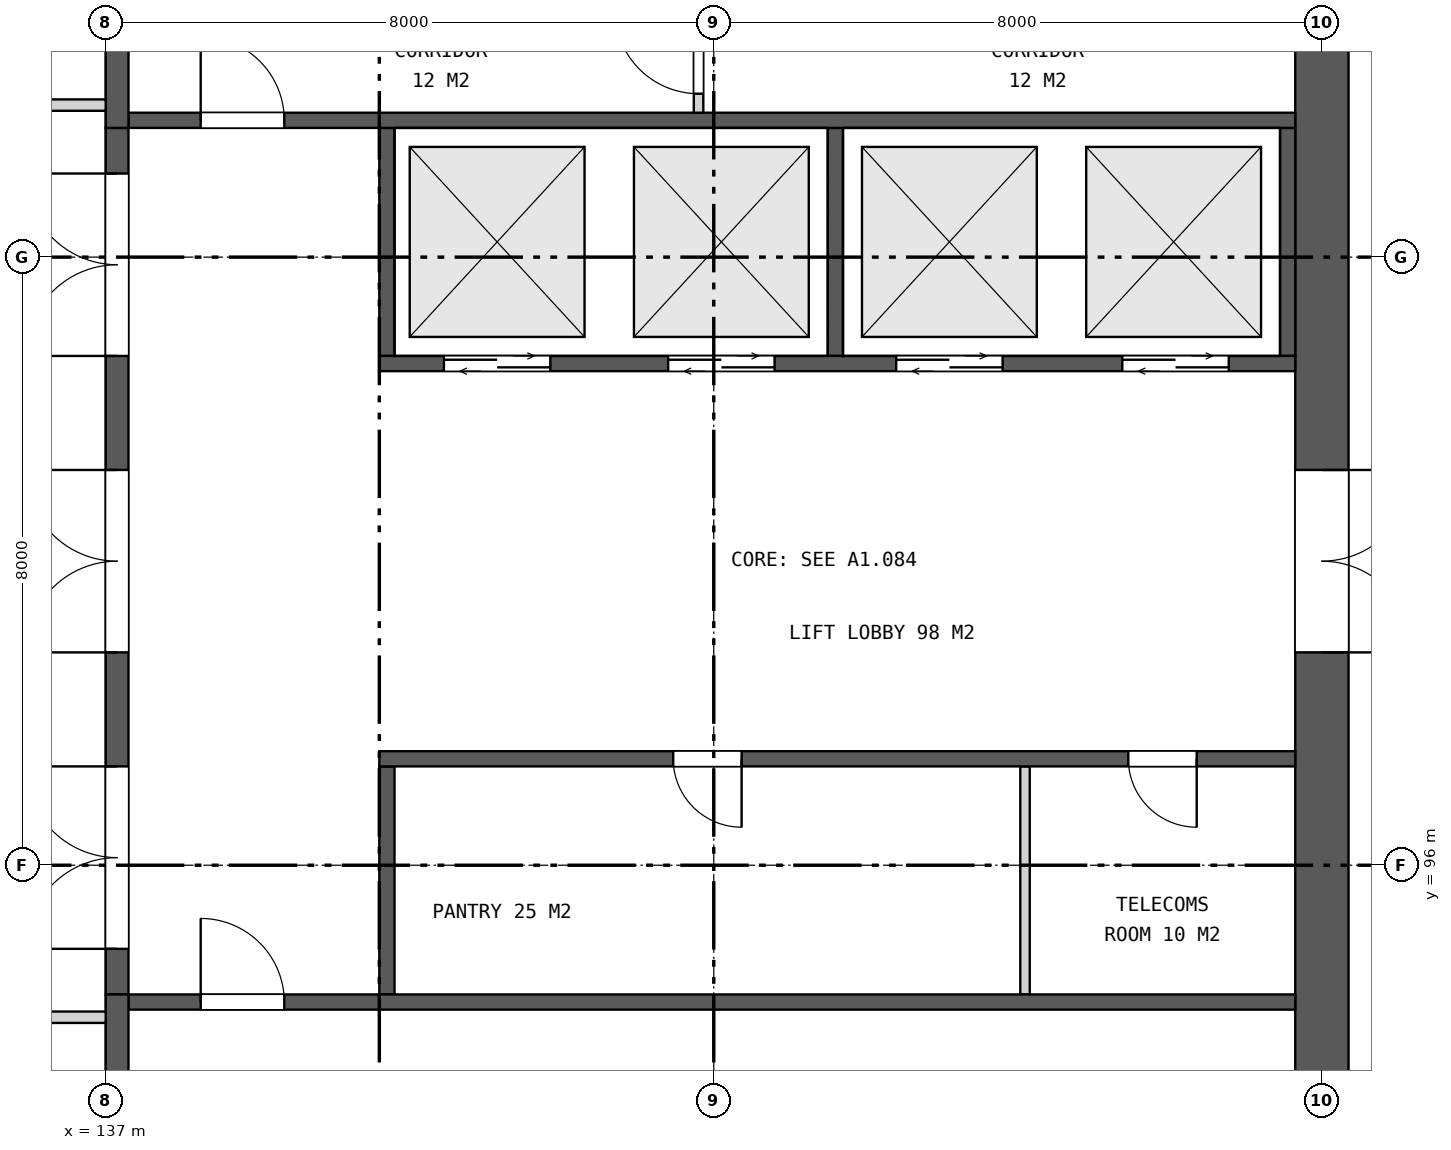
"""IFC4 building model, lengths in metres.
Left out: names, types, materials, properties, quantities, classifications, styles, units other than length and angle.
Written with IfcOpenShell. Run it as: python <this file> out.ifc"""

import sys

from ifc_helpers import new_model, si_unit, direction, frame, frame_2d, origin, place, context, subcontext, project, spatial, rectangle, extrude, element, fill, save


model = new_model("IFC4")
c1 = context("Model", 3, precision=1e-05, world=origin(), true_north=direction((0.0, 1.0)))
c2 = subcontext(c1, "Body", "Model", "MODEL_VIEW")
j1 = project(units=[si_unit("LENGTHUNIT", "METRE"), si_unit("PLANEANGLEUNIT", "RADIAN")], contexts=[c1])
p1 = place(None, origin())
s1 = spatial("IfcSite", under=j1, at=p1, CompositionType="ELEMENT")
p2 = place(p1, origin())
s2 = spatial("IfcBuilding", under=s1, at=p2, CompositionType="ELEMENT")
p3 = place(p2, frame((0.0, 0.0, 167.3)))
s3 = spatial("IfcBuildingStorey", under=s2, at=p3, CompositionType="ELEMENT", Elevation=167.3)
p4 = place(p3, frame((153.0, 88.35, 0.0), z_axis=(0.0, 0.0, 1.0), x_axis=(0.0, 1.0, 0.0)))
e1 = element("IfcWall", 1, at=p4, inside=s3, PredefinedType="SHEAR", context=c2, shape_type="SweptSolid", body=[
    extrude(rectangle(XDim=23.3, YDim=0.7, at=frame_2d((11.65, 0.0))), origin(), (0.0, 0.0, 1.0), 4.2),
])
p5 = place(p4, frame((10.45, 0.0, 0.0)))
e2 = element("IfcOpeningElement", 2, at=p5, cuts=e1, PredefinedType="OPENING", context=c2, shape_type="SweptSolid", body=[
    extrude(rectangle(XDim=2.4, YDim=2.4, at=frame_2d((1.2, 1.2))), frame((0.0, 0.36, 0.0), z_axis=(0.0, -1.0, 0.0), x_axis=(1.0, 0.0, 0.0)), (0.0, 0.0, 1.0), 0.72),
])
p6 = place(p3, frame((137.15, 94.3, 0.0), z_axis=(0.0, 0.0, 1.0), x_axis=(0.0, 1.0, 0.0)))
e3 = element("IfcWall", 3, at=p6, inside=s3, PredefinedType="SHEAR", context=c2, shape_type="SweptSolid", body=[
    extrude(rectangle(XDim=11.4, YDim=0.3, at=frame_2d((5.7, 0.0))), origin(), (0.0, 0.0, 1.0), 4.2),
])
p7 = place(p6, frame((0.6, 0.0, 0.0)))
e4 = element("IfcOpeningElement", 4, at=p7, cuts=e3, PredefinedType="OPENING", context=c2, shape_type="SweptSolid", body=[
    extrude(rectangle(XDim=2.4, YDim=2.4, at=frame_2d((1.2, 1.2))), frame((0.0, 0.16, 0.0), z_axis=(0.0, -1.0, 0.0), x_axis=(1.0, 0.0, 0.0)), (0.0, 0.0, 1.0), 0.32),
])
p8 = place(p6, frame((4.5, 0.0, 0.0)))
e5 = element("IfcOpeningElement", 5, at=p8, cuts=e3, PredefinedType="OPENING", context=c2, shape_type="SweptSolid", body=[
    extrude(rectangle(XDim=2.4, YDim=2.4, at=frame_2d((1.2, 1.2))), frame((0.0, 0.16, 0.0), z_axis=(0.0, -1.0, 0.0), x_axis=(1.0, 0.0, 0.0)), (0.0, 0.0, 1.0), 0.32),
])
p9 = place(p6, frame((8.4, 0.0, 0.0)))
e6 = element("IfcOpeningElement", 6, at=p9, cuts=e3, PredefinedType="OPENING", context=c2, shape_type="SweptSolid", body=[
    extrude(rectangle(XDim=2.4, YDim=2.4, at=frame_2d((1.2, 1.2))), frame((0.0, 0.16, 0.0), z_axis=(0.0, -1.0, 0.0), x_axis=(1.0, 0.0, 0.0)), (0.0, 0.0, 1.0), 0.32),
])
for number, where, z_axis, x_axis in (
    (7, (140.7, 102.7, 0.0), (0.0, 0.0, 1.0), (0.0, 1.0, 0.0)),
    (8, (146.6, 102.7, 0.0), (0.0, 0.0, 1.0), (0.0, 1.0, 0.0)),
    (9, (152.55, 102.7, 0.0), (0.0, 0.0, 1.0), (0.0, 1.0, 0.0)),
):
    element("IfcWall", number, at=place(p3, frame(where, z_axis=z_axis, x_axis=x_axis)), inside=s3, PredefinedType="SHEAR", context=c2, shape_type="SweptSolid", body=[
        extrude(rectangle(XDim=3.0, YDim=0.2, at=frame_2d((1.5, 0.0))), origin(), (0.0, 0.0, 1.0), 4.2),
    ])
p10 = place(p3, frame((140.6, 102.6, 0.0), z_axis=(0.0, 0.0, 1.0), x_axis=(1.0, 0.0, 0.0)))
e10 = element("IfcWall", 10, at=p10, inside=s3, PredefinedType="SHEAR", context=c2, shape_type="SweptSolid", body=[
    extrude(rectangle(XDim=12.05, YDim=0.2, at=frame_2d((6.025, 0.0))), origin(), (0.0, 0.0, 1.0), 4.2),
])
p11 = place(p10, frame((0.85, 0.0, 0.0)))
e11 = element("IfcOpeningElement", 11, at=p11, cuts=e10, PredefinedType="OPENING", context=c2, shape_type="SweptSolid", body=[
    extrude(rectangle(XDim=1.4, YDim=2.1, at=frame_2d((0.7, 1.05))), frame((0.0, 0.11, 0.0), z_axis=(0.0, -1.0, 0.0), x_axis=(1.0, 0.0, 0.0)), (0.0, 0.0, 1.0), 0.22),
])
p12 = place(p10, frame((3.8, 0.0, 0.0)))
e12 = element("IfcOpeningElement", 12, at=p12, cuts=e10, PredefinedType="OPENING", context=c2, shape_type="SweptSolid", body=[
    extrude(rectangle(XDim=1.4, YDim=2.1, at=frame_2d((0.7, 1.05))), frame((0.0, 0.11, 0.0), z_axis=(0.0, -1.0, 0.0), x_axis=(1.0, 0.0, 0.0)), (0.0, 0.0, 1.0), 0.22),
])
p13 = place(p10, frame((6.8, 0.0, 0.0)))
e13 = element("IfcOpeningElement", 13, at=p13, cuts=e10, PredefinedType="OPENING", context=c2, shape_type="SweptSolid", body=[
    extrude(rectangle(XDim=1.4, YDim=2.1, at=frame_2d((0.7, 1.05))), frame((0.0, 0.11, 0.0), z_axis=(0.0, -1.0, 0.0), x_axis=(1.0, 0.0, 0.0)), (0.0, 0.0, 1.0), 0.22),
])
p14 = place(p10, frame((9.775, 0.0, 0.0)))
e14 = element("IfcOpeningElement", 14, at=p14, cuts=e10, PredefinedType="OPENING", context=c2, shape_type="SweptSolid", body=[
    extrude(rectangle(XDim=1.4, YDim=2.1, at=frame_2d((0.7, 1.05))), frame((0.0, 0.11, 0.0), z_axis=(0.0, -1.0, 0.0), x_axis=(1.0, 0.0, 0.0)), (0.0, 0.0, 1.0), 0.22),
])
p15 = place(p3, frame((140.7, 94.3, 0.0), z_axis=(0.0, 0.0, 1.0), x_axis=(0.0, 1.0, 0.0)))
e15 = element("IfcWall", 15, at=p15, inside=s3, PredefinedType="SHEAR", context=c2, shape_type="SweptSolid", body=[
    extrude(rectangle(XDim=3.0, YDim=0.2, at=frame_2d((1.5, 0.0))), origin(), (0.0, 0.0, 1.0), 4.2),
])
p16 = place(p3, frame((149.095, 94.3, 0.0), z_axis=(0.0, 0.0, 1.0), x_axis=(0.0, 1.0, 0.0)))
e16 = element("IfcWall", 16, at=p16, inside=s3, PredefinedType="PARTITIONING", context=c2, shape_type="SweptSolid", body=[
    extrude(rectangle(XDim=3.0, YDim=0.125, at=frame_2d((1.5, 0.0))), origin(), (0.0, 0.0, 1.0), 4.2),
])
p17 = place(p3, frame((140.6, 97.4, 0.0), z_axis=(0.0, 0.0, 1.0), x_axis=(1.0, 0.0, 0.0)))
e17 = element("IfcWall", 17, at=p17, inside=s3, PredefinedType="SHEAR", context=c2, shape_type="SweptSolid", body=[
    extrude(rectangle(XDim=12.05, YDim=0.2, at=frame_2d((6.025, 0.0))), origin(), (0.0, 0.0, 1.0), 4.2),
])
p18 = place(p17, frame((3.866, 0.0, 0.0)))
e18 = element("IfcOpeningElement", 18, at=p18, cuts=e17, PredefinedType="OPENING", context=c2, shape_type="SweptSolid", body=[
    extrude(rectangle(XDim=0.9, YDim=2.1, at=frame_2d((0.45, 1.05))), frame((0.0, 0.11, 0.0), z_axis=(0.0, -1.0, 0.0), x_axis=(1.0, 0.0, 0.0)), (0.0, 0.0, 1.0), 0.22),
])
p19 = place(p17, frame((9.854, 0.0, 0.0)))
e19 = element("IfcOpeningElement", 19, at=p19, cuts=e17, PredefinedType="OPENING", context=c2, shape_type="SweptSolid", body=[
    extrude(rectangle(XDim=0.9, YDim=2.1, at=frame_2d((0.45, 1.05))), frame((0.0, 0.11, 0.0), z_axis=(0.0, -1.0, 0.0), x_axis=(1.0, 0.0, 0.0)), (0.0, 0.0, 1.0), 0.22),
])
p20 = place(p3, frame((137.3, 105.8, 0.0), z_axis=(0.0, 0.0, 1.0), x_axis=(1.0, 0.0, 0.0)))
e20 = element("IfcWall", 20, at=p20, inside=s3, PredefinedType="SHEAR", context=c2, shape_type="SweptSolid", body=[
    extrude(rectangle(XDim=15.35, YDim=0.2, at=frame_2d((7.675, 0.0))), origin(), (0.0, 0.0, 1.0), 4.2),
])
p21 = place(p20, frame((0.95, 0.0, 0.0)))
e21 = element("IfcOpeningElement", 21, at=p21, cuts=e20, PredefinedType="OPENING", context=c2, shape_type="SweptSolid", body=[
    extrude(rectangle(XDim=1.1, YDim=2.1, at=frame_2d((0.55, 1.05))), frame((0.0, 0.11, 0.0), z_axis=(0.0, -1.0, 0.0), x_axis=(1.0, 0.0, 0.0)), (0.0, 0.0, 1.0), 0.22),
])
p22 = place(p3, frame((137.15, 105.7, 0.0), z_axis=(0.0, 0.0, 1.0), x_axis=(0.0, 1.0, 0.0)))
e22 = element("IfcWall", 22, at=p22, inside=s3, PredefinedType="SHEAR", context=c2, shape_type="SweptSolid", body=[
    extrude(rectangle(XDim=5.95, YDim=0.3, at=frame_2d((2.975, 0.0))), origin(), (0.0, 0.0, 1.0), 4.2),
])
p23 = place(p3, frame((144.8, 105.9, 0.0), z_axis=(0.0, 0.0, 1.0), x_axis=(0.0, 1.0, 0.0)))
e23 = element("IfcWall", 23, at=p23, inside=s3, PredefinedType="PARTITIONING", context=c2, shape_type="SweptSolid", body=[
    extrude(rectangle(XDim=1.6, YDim=0.125, at=frame_2d((0.8, 0.0))), origin(), (0.0, 0.0, 1.0), 4.2),
])
p24 = place(p23, frame((0.25, 0.0, 0.0)))
e24 = element("IfcOpeningElement", 24, at=p24, cuts=e23, PredefinedType="OPENING", context=c2, shape_type="SweptSolid", body=[
    extrude(rectangle(XDim=1.1, YDim=2.1, at=frame_2d((0.55, 1.05))), frame((0.0, 0.073, 0.0), z_axis=(0.0, -1.0, 0.0), x_axis=(1.0, 0.0, 0.0)), (0.0, 0.0, 1.0), 0.145),
])
p25 = place(p3, frame((137.3, 94.2, 0.0), z_axis=(0.0, 0.0, 1.0), x_axis=(1.0, 0.0, 0.0)))
e25 = element("IfcWall", 25, at=p25, inside=s3, PredefinedType="SHEAR", context=c2, shape_type="SweptSolid", body=[
    extrude(rectangle(XDim=15.35, YDim=0.2, at=frame_2d((7.675, 0.0))), origin(), (0.0, 0.0, 1.0), 4.2),
])
p26 = place(p25, frame((0.95, 0.0, 0.0)))
e26 = element("IfcOpeningElement", 26, at=p26, cuts=e25, PredefinedType="OPENING", context=c2, shape_type="SweptSolid", body=[
    extrude(rectangle(XDim=1.1, YDim=2.1, at=frame_2d((0.55, 1.05))), frame((0.0, 0.11, 0.0), z_axis=(0.0, -1.0, 0.0), x_axis=(1.0, 0.0, 0.0)), (0.0, 0.0, 1.0), 0.22),
])
p27 = place(p3, frame((137.15, 88.35, 0.0), z_axis=(0.0, 0.0, 1.0), x_axis=(0.0, 1.0, 0.0)))
e27 = element("IfcWall", 27, at=p27, inside=s3, PredefinedType="SHEAR", context=c2, shape_type="SweptSolid", body=[
    extrude(rectangle(XDim=5.95, YDim=0.3, at=frame_2d((2.975, 0.0))), origin(), (0.0, 0.0, 1.0), 4.2),
])
for number, where, z_axis, x_axis in (
    (28, (131.475, 94.0, 0.0), (0.0, 0.0, 1.0), (1.0, 0.0, 0.0)),
    (29, (131.475, 106.0, 0.0), (0.0, 0.0, 1.0), (1.0, 0.0, 0.0)),
):
    element("IfcWall", number, at=place(p3, frame(where, z_axis=z_axis, x_axis=x_axis)), inside=s3, PredefinedType="PARTITIONING", context=c2, shape_type="SweptSolid", body=[
        extrude(rectangle(XDim=5.525, YDim=0.15, at=frame_2d((2.762, 0.0))), origin(), (0.0, 0.0, 1.0), 3.26),
    ])
p28 = place(p5, frame((2.4, 0.0, 0.0), z_axis=(0.0, 0.0, 1.0), x_axis=(-1.0, 0.0, 0.0)))
e30 = element("IfcDoor", 30, at=p28, inside=s3, OperationType="DOUBLE_DOOR_SINGLE_SWING", PredefinedType="DOOR", context=c2, shape_type="SweptSolid", body=[
    extrude(rectangle(XDim=2.4, YDim=2.4, at=frame_2d((1.2, 1.2))), frame((0.0, 0.025, 0.0), z_axis=(0.0, -1.0, 0.0), x_axis=(1.0, 0.0, 0.0)), (0.0, 0.0, 1.0), 0.05),
])
fill(e2, e30)
p29 = place(p7, origin())
e31 = element("IfcDoor", 31, at=p29, inside=s3, OperationType="DOUBLE_DOOR_SINGLE_SWING", PredefinedType="DOOR", context=c2, shape_type="SweptSolid", body=[
    extrude(rectangle(XDim=2.4, YDim=2.4, at=frame_2d((1.2, 1.2))), frame((0.0, 0.025, 0.0), z_axis=(0.0, -1.0, 0.0), x_axis=(1.0, 0.0, 0.0)), (0.0, 0.0, 1.0), 0.05),
])
fill(e4, e31)
p30 = place(p8, origin())
e32 = element("IfcDoor", 32, at=p30, inside=s3, OperationType="DOUBLE_DOOR_SINGLE_SWING", PredefinedType="DOOR", context=c2, shape_type="SweptSolid", body=[
    extrude(rectangle(XDim=2.4, YDim=2.4, at=frame_2d((1.2, 1.2))), frame((0.0, 0.025, 0.0), z_axis=(0.0, -1.0, 0.0), x_axis=(1.0, 0.0, 0.0)), (0.0, 0.0, 1.0), 0.05),
])
fill(e5, e32)
p31 = place(p9, origin())
e33 = element("IfcDoor", 33, at=p31, inside=s3, OperationType="DOUBLE_DOOR_SINGLE_SWING", PredefinedType="DOOR", context=c2, shape_type="SweptSolid", body=[
    extrude(rectangle(XDim=2.4, YDim=2.4, at=frame_2d((1.2, 1.2))), frame((0.0, 0.025, 0.0), z_axis=(0.0, -1.0, 0.0), x_axis=(1.0, 0.0, 0.0)), (0.0, 0.0, 1.0), 0.05),
])
fill(e6, e33)
p32 = place(p11, origin())
e34 = element("IfcDoor", 34, at=p32, inside=s3, OperationType="DOUBLE_DOOR_SLIDING", PredefinedType="DOOR", context=c2, shape_type="SweptSolid", body=[
    extrude(rectangle(XDim=1.4, YDim=2.1, at=frame_2d((0.7, 1.05))), frame((0.0, 0.025, 0.0), z_axis=(0.0, -1.0, 0.0), x_axis=(1.0, 0.0, 0.0)), (0.0, 0.0, 1.0), 0.05),
])
fill(e11, e34)
p33 = place(p12, origin())
e35 = element("IfcDoor", 35, at=p33, inside=s3, OperationType="DOUBLE_DOOR_SLIDING", PredefinedType="DOOR", context=c2, shape_type="SweptSolid", body=[
    extrude(rectangle(XDim=1.4, YDim=2.1, at=frame_2d((0.7, 1.05))), frame((0.0, 0.025, 0.0), z_axis=(0.0, -1.0, 0.0), x_axis=(1.0, 0.0, 0.0)), (0.0, 0.0, 1.0), 0.05),
])
fill(e12, e35)
p34 = place(p13, origin())
e36 = element("IfcDoor", 36, at=p34, inside=s3, OperationType="DOUBLE_DOOR_SLIDING", PredefinedType="DOOR", context=c2, shape_type="SweptSolid", body=[
    extrude(rectangle(XDim=1.4, YDim=2.1, at=frame_2d((0.7, 1.05))), frame((0.0, 0.025, 0.0), z_axis=(0.0, -1.0, 0.0), x_axis=(1.0, 0.0, 0.0)), (0.0, 0.0, 1.0), 0.05),
])
fill(e13, e36)
p35 = place(p14, origin())
e37 = element("IfcDoor", 37, at=p35, inside=s3, OperationType="DOUBLE_DOOR_SLIDING", PredefinedType="DOOR", context=c2, shape_type="SweptSolid", body=[
    extrude(rectangle(XDim=1.4, YDim=2.1, at=frame_2d((0.7, 1.05))), frame((0.0, 0.025, 0.0), z_axis=(0.0, -1.0, 0.0), x_axis=(1.0, 0.0, 0.0)), (0.0, 0.0, 1.0), 0.05),
])
fill(e14, e37)
p36 = place(p18, frame((0.9, 0.0, 0.0), z_axis=(0.0, 0.0, 1.0), x_axis=(-1.0, 0.0, 0.0)))
e38 = element("IfcDoor", 38, at=p36, inside=s3, OperationType="SINGLE_SWING_LEFT", PredefinedType="DOOR", context=c2, shape_type="SweptSolid", body=[
    extrude(rectangle(XDim=0.9, YDim=2.1, at=frame_2d((0.45, 1.05))), frame((0.0, 0.025, 0.0), z_axis=(0.0, -1.0, 0.0), x_axis=(1.0, 0.0, 0.0)), (0.0, 0.0, 1.0), 0.05),
])
fill(e18, e38)
p37 = place(p19, frame((0.9, 0.0, 0.0), z_axis=(0.0, 0.0, 1.0), x_axis=(-1.0, 0.0, 0.0)))
e39 = element("IfcDoor", 39, at=p37, inside=s3, OperationType="SINGLE_SWING_LEFT", PredefinedType="DOOR", context=c2, shape_type="SweptSolid", body=[
    extrude(rectangle(XDim=0.9, YDim=2.1, at=frame_2d((0.45, 1.05))), frame((0.0, 0.025, 0.0), z_axis=(0.0, -1.0, 0.0), x_axis=(1.0, 0.0, 0.0)), (0.0, 0.0, 1.0), 0.05),
])
fill(e19, e39)
p38 = place(p21, origin())
e40 = element("IfcDoor", 40, at=p38, inside=s3, OperationType="SINGLE_SWING_LEFT", PredefinedType="DOOR", context=c2, shape_type="SweptSolid", body=[
    extrude(rectangle(XDim=1.1, YDim=2.1, at=frame_2d((0.55, 1.05))), frame((0.0, 0.025, 0.0), z_axis=(0.0, -1.0, 0.0), x_axis=(1.0, 0.0, 0.0)), (0.0, 0.0, 1.0), 0.05),
])
fill(e21, e40)
p39 = place(p24, origin())
e41 = element("IfcDoor", 41, at=p39, inside=s3, OperationType="SINGLE_SWING_RIGHT", PredefinedType="DOOR", context=c2, shape_type="SweptSolid", body=[
    extrude(rectangle(XDim=1.1, YDim=2.1, at=frame_2d((0.55, 1.05))), frame((0.0, 0.025, 0.0), z_axis=(0.0, -1.0, 0.0), x_axis=(1.0, 0.0, 0.0)), (0.0, 0.0, 1.0), 0.05),
])
fill(e24, e41)
p40 = place(p26, origin())
e42 = element("IfcDoor", 42, at=p40, inside=s3, OperationType="SINGLE_SWING_LEFT", PredefinedType="DOOR", context=c2, shape_type="SweptSolid", body=[
    extrude(rectangle(XDim=1.1, YDim=2.1, at=frame_2d((0.55, 1.05))), frame((0.0, 0.025, 0.0), z_axis=(0.0, -1.0, 0.0), x_axis=(1.0, 0.0, 0.0)), (0.0, 0.0, 1.0), 0.05),
])
fill(e26, e42)
save(model, sys.argv[1])
